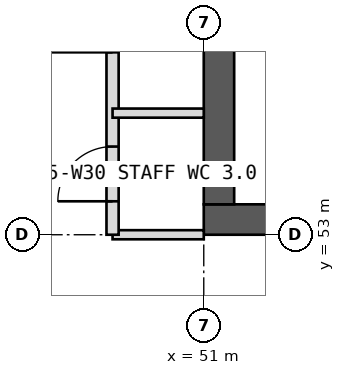
"""IFC4 building model, lengths in metres.
Left out: names, types, materials, properties, quantities, classifications, styles, units other than length and angle.
Written with IfcOpenShell. Run it as: python <this file> out.ifc"""

import sys

from ifc_helpers import new_model, si_unit, direction, frame, frame_2d, origin, place, context, subcontext, project, spatial, rectangle, extrude, element, fill, save


model = new_model("IFC4")
c1 = context("Model", 3, precision=1e-05, world=origin(), true_north=direction((0.0, 1.0)))
c2 = subcontext(c1, "Body", "Model", "MODEL_VIEW")
j1 = project(units=[si_unit("LENGTHUNIT", "METRE"), si_unit("PLANEANGLEUNIT", "RADIAN")], contexts=[c1])
p1 = place(None, origin())
s1 = spatial("IfcSite", under=j1, at=p1, CompositionType="ELEMENT")
p2 = place(p1, origin())
s2 = spatial("IfcBuilding", under=s1, at=p2, CompositionType="ELEMENT")
p3 = place(p2, frame((0.0, 0.0, 270.0)))
s3 = spatial("IfcBuildingStorey", under=s2, at=p3, CompositionType="ELEMENT", Elevation=270.0)
p4 = place(p3, frame((51.0, 53.25, 0.0), z_axis=(0.0, 0.0, 1.0), x_axis=(1.0, 0.0, 0.0)))
e1 = element("IfcWall", 1, at=p4, inside=s3, PredefinedType="SHEAR", context=c2, shape_type="SweptSolid", body=[
    extrude(rectangle(XDim=18.0, YDim=0.5, at=frame_2d((9.0, 0.0))), origin(), (0.0, 0.0, 1.0), 4.0),
])
p5 = place(p4, frame((8.1, 0.0, 0.0)))
e2 = element("IfcOpeningElement", 2, at=p5, cuts=e1, PredefinedType="OPENING", context=c2, shape_type="SweptSolid", body=[
    extrude(rectangle(XDim=1.8, YDim=2.2, at=frame_2d((0.9, 1.1))), frame((0.0, 0.26, 0.0), z_axis=(0.0, -1.0, 0.0), x_axis=(1.0, 0.0, 0.0)), (0.0, 0.0, 1.0), 0.52),
])
p6 = place(p3, frame((51.25, 53.5, 0.0), z_axis=(0.0, 0.0, 1.0), x_axis=(0.0, 1.0, 0.0)))
e3 = element("IfcWall", 3, at=p6, inside=s3, PredefinedType="SHEAR", context=c2, shape_type="SweptSolid", body=[
    extrude(rectangle(XDim=17.0, YDim=0.5, at=frame_2d((8.5, 0.0))), origin(), (0.0, 0.0, 1.0), 4.0),
])
p7 = place(p6, frame((6.1, 0.0, 0.0)))
e4 = element("IfcOpeningElement", 4, at=p7, cuts=e3, PredefinedType="OPENING", context=c2, shape_type="SweptSolid", body=[
    extrude(rectangle(XDim=1.5, YDim=2.2, at=frame_2d((0.75, 1.1))), frame((0.0, 0.26, 0.0), z_axis=(0.0, -1.0, 0.0), x_axis=(1.0, 0.0, 0.0)), (0.0, 0.0, 1.0), 0.52),
])
p8 = place(p3, frame((51.0, 53.0, 0.0), z_axis=(0.0, 0.0, 1.0), x_axis=(-1.0, 0.0, 0.0)))
e5 = element("IfcWall", 5, at=p8, inside=s3, PredefinedType="PARTITIONING", context=c2, shape_type="SweptSolid", body=[
    extrude(rectangle(XDim=1.5, YDim=0.15, at=frame_2d((0.75, 0.0))), origin(), (0.0, 0.0, 1.0), 3.75),
])
p9 = place(p3, frame((49.5, 53.0, 0.0), z_axis=(0.0, 0.0, 1.0), x_axis=(0.0, 1.0, 0.0)))
e6 = element("IfcWall", 6, at=p9, inside=s3, PredefinedType="PARTITIONING", context=c2, shape_type="SweptSolid", body=[
    extrude(rectangle(XDim=5.0, YDim=0.2, at=frame_2d((2.5, 0.0))), origin(), (0.0, 0.0, 1.0), 3.75),
])
p10 = place(p9, frame((0.55, 0.0, 0.0)))
e7 = element("IfcOpeningElement", 7, at=p10, cuts=e6, PredefinedType="OPENING", context=c2, shape_type="SweptSolid", body=[
    extrude(rectangle(XDim=0.9, YDim=2.1, at=frame_2d((0.45, 1.05))), frame((0.0, 0.11, 0.0), z_axis=(0.0, -1.0, 0.0), x_axis=(1.0, 0.0, 0.0)), (0.0, 0.0, 1.0), 0.22),
])
p11 = place(p9, frame((3.0, 0.0, 0.0)))
e8 = element("IfcOpeningElement", 8, at=p11, cuts=e6, PredefinedType="OPENING", context=c2, shape_type="SweptSolid", body=[
    extrude(rectangle(XDim=1.0, YDim=2.1, at=frame_2d((0.5, 1.05))), frame((0.0, 0.11, 0.0), z_axis=(0.0, -1.0, 0.0), x_axis=(1.0, 0.0, 0.0)), (0.0, 0.0, 1.0), 0.22),
])
p12 = place(p3, frame((51.0, 55.0, 0.0), z_axis=(0.0, 0.0, 1.0), x_axis=(-1.0, 0.0, 0.0)))
e9 = element("IfcWall", 9, at=p12, inside=s3, PredefinedType="PARTITIONING", context=c2, shape_type="SweptSolid", body=[
    extrude(rectangle(XDim=1.5, YDim=0.15, at=frame_2d((0.75, 0.0))), origin(), (0.0, 0.0, 1.0), 3.75),
])
p13 = place(p10, origin())
e10 = element("IfcDoor", 10, at=p13, inside=s3, OperationType="SINGLE_SWING_LEFT", PredefinedType="DOOR", context=c2, shape_type="SweptSolid", body=[
    extrude(rectangle(XDim=0.9, YDim=2.1, at=frame_2d((0.45, 1.05))), frame((0.0, 0.025, 0.0), z_axis=(0.0, -1.0, 0.0), x_axis=(1.0, 0.0, 0.0)), (0.0, 0.0, 1.0), 0.05),
])
fill(e7, e10)
save(model, sys.argv[1])
